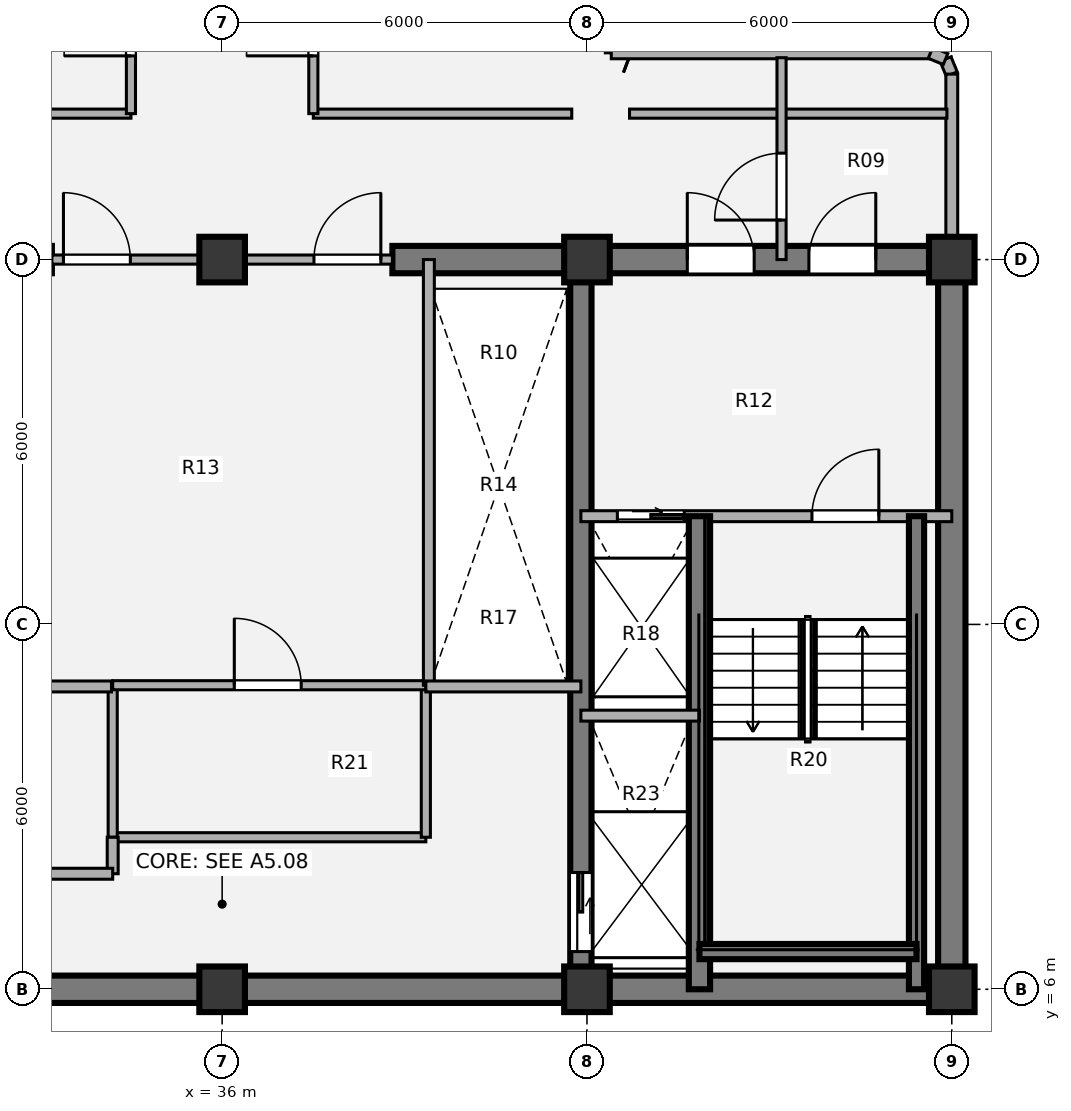
"""IFC4 building model, lengths in metres.
Left out: names, types, materials, properties, quantities, classifications, styles, units other than length and angle.
Written with IfcOpenShell. Run it as: python <this file> out.ifc"""

import sys

from ifc_helpers import new_model, si_unit, direction, frame, frame_2d, origin, origin_2d, place, context, subcontext, project, spatial, rectangle, extrude, source, transform, mapped, element, fill, save


model = new_model("IFC4")
c1 = context("Model", 3, precision=1e-05, world=origin(), true_north=direction((0.0, 1.0)))
c2 = subcontext(c1, "Body", "Model", "MODEL_VIEW")
j1 = project(units=[si_unit("LENGTHUNIT", "METRE"), si_unit("PLANEANGLEUNIT", "RADIAN")], contexts=[c1])
p1 = place(None, origin())
s1 = spatial("IfcSite", under=j1, at=p1, CompositionType="ELEMENT")
p2 = place(p1, origin())
s2 = spatial("IfcBuilding", under=s1, at=p2, CompositionType="ELEMENT")
p3 = place(p2, frame((0.0, 0.0, 213.12)))
s3 = spatial("IfcBuildingStorey", under=s2, at=p3, CompositionType="ELEMENT", Elevation=213.12)
m1 = source(origin(), c2, "Body", "SweptSolid", [
    extrude(rectangle(XDim=0.75, YDim=0.75, at=origin_2d()), origin(), (0.0, 0.0, 1.0), 5.4),
])
for number, where, z_axis, x_axis in (
    (1, (36.0, 6.0, 0.0), (0.0, 0.0, 1.0), (1.0, 0.0, 0.0)),
    (2, (42.0, 6.0, 0.0), (0.0, 0.0, 1.0), (1.0, 0.0, 0.0)),
    (3, (48.0, 6.0, 0.0), (0.0, 0.0, 1.0), (1.0, 0.0, 0.0)),
    (4, (36.0, 18.0, 0.0), (0.0, 0.0, 1.0), (1.0, 0.0, 0.0)),
    (5, (42.0, 18.0, 0.0), (0.0, 0.0, 1.0), (1.0, 0.0, 0.0)),
    (6, (48.0, 18.0, 0.0), (0.0, 0.0, 1.0), (1.0, 0.0, 0.0)),
):
    element("IfcColumn", number, at=place(p3, frame(where, z_axis=z_axis, x_axis=x_axis)), inside=s3, PredefinedType="COLUMN", context=c2, shape_type="MappedRepresentation", body=[
        mapped(m1, transform((0.0, 0.0, 0.0), x_axis=(1.0, 0.0, 0.0), y_axis=(0.0, 1.0, 0.0), z_axis=(0.0, 0.0, 1.0), scale=1.0)),
    ])
p4 = place(p3, frame((48.225, 6.0, 0.0), z_axis=(0.0, 0.0, 1.0), x_axis=(-1.0, 0.0, 0.0)))
e7 = element("IfcWall", 7, at=p4, inside=s3, PredefinedType="SHEAR", context=c2, shape_type="SweptSolid", body=[
    extrude(rectangle(XDim=24.45, YDim=0.45, at=frame_2d((12.225, 0.0))), origin(), (0.0, 0.0, 1.0), 5.4),
])
p5 = place(p3, frame((48.0, 18.0, 0.0), z_axis=(0.0, 0.0, 1.0), x_axis=(0.0, -1.0, 0.0)))
e8 = element("IfcWall", 8, at=p5, inside=s3, PredefinedType="SHEAR", context=c2, shape_type="SweptSolid", body=[
    extrude(rectangle(XDim=12.0, YDim=0.45, at=frame_2d((6.0, 0.0))), origin(), (0.0, 0.0, 1.0), 5.4),
])
p6 = place(p3, frame((38.8, 18.0, 0.0), z_axis=(0.0, 0.0, 1.0), x_axis=(1.0, 0.0, 0.0)))
e9 = element("IfcWall", 9, at=p6, inside=s3, PredefinedType="SHEAR", context=c2, shape_type="SweptSolid", body=[
    extrude(rectangle(XDim=9.425, YDim=0.45, at=frame_2d((4.712, 0.0))), origin(), (0.0, 0.0, 1.0), 5.4),
])
p7 = place(p6, frame((4.85, 0.0, 0.0)))
e10 = element("IfcOpeningElement", 10, at=p7, cuts=e9, PredefinedType="OPENING", context=c2, shape_type="SweptSolid", body=[
    extrude(rectangle(XDim=1.1, YDim=2.1, at=origin_2d()), frame((0.55, 0.235, 1.05), z_axis=(0.0, -1.0, 0.0), x_axis=(1.0, 0.0, 0.0)), (0.0, 0.0, 1.0), 0.47),
])
p8 = place(p6, frame((6.85, 0.0, 0.0)))
e11 = element("IfcOpeningElement", 11, at=p8, cuts=e9, PredefinedType="OPENING", context=c2, shape_type="SweptSolid", body=[
    extrude(rectangle(XDim=1.1, YDim=2.1, at=origin_2d()), frame((0.55, 0.235, 1.05), z_axis=(0.0, -1.0, 0.0), x_axis=(1.0, 0.0, 0.0)), (0.0, 0.0, 1.0), 0.47),
])
p9 = place(p3, frame((41.9, 18.0, 0.0), z_axis=(0.0, 0.0, 1.0), x_axis=(0.0, -1.0, 0.0)))
e12 = element("IfcWall", 12, at=p9, inside=s3, PredefinedType="SHEAR", context=c2, shape_type="SweptSolid", body=[
    extrude(rectangle(XDim=12.0, YDim=0.35, at=frame_2d((6.0, 0.0))), origin(), (0.0, 0.0, 1.0), 5.4),
])
p10 = place(p9, frame((10.08, 0.0, 0.0)))
e13 = element("IfcOpeningElement", 13, at=p10, cuts=e12, PredefinedType="OPENING", context=c2, shape_type="SweptSolid", body=[
    extrude(rectangle(XDim=1.3, YDim=2.1, at=origin_2d()), frame((0.65, 0.185, 1.05), z_axis=(0.0, -1.0, 0.0), x_axis=(1.0, 0.0, 0.0)), (0.0, 0.0, 1.0), 0.37),
])
p11 = place(p3, frame((47.897, 21.298, 0.0), z_axis=(0.0, 0.0, 1.0), x_axis=(0.382673670509, -0.923883575944, 0.0)))
e14 = element("IfcWall", 14, at=p11, inside=s3, PredefinedType="SOLIDWALL", context=c2, shape_type="SweptSolid", body=[
    extrude(rectangle(XDim=0.268, YDim=0.195, at=frame_2d((0.134, 0.0))), origin(), (0.0, 0.0, 1.0), 5.08),
])
p12 = place(p3, frame((48.0, 21.05, 0.0), z_axis=(0.0, 0.0, 1.0), x_axis=(0.0, -1.0, 0.0)))
e15 = element("IfcWall", 15, at=p12, inside=s3, PredefinedType="SOLIDWALL", context=c2, shape_type="SweptSolid", body=[
    extrude(rectangle(XDim=2.695, YDim=0.195, at=frame_2d((1.348, 0.0))), origin(), (0.0, 0.0, 1.0), 3.268),
])
p13 = place(p3, frame((42.4, 21.4, 0.0), z_axis=(0.0, 0.0, 1.0), x_axis=(1.0, 0.0, 0.0)))
e16 = element("IfcWall", 16, at=p13, inside=s3, PredefinedType="SOLIDWALL", context=c2, shape_type="SweptSolid", body=[
    extrude(rectangle(XDim=5.25, YDim=0.195, at=frame_2d((2.625, 0.0))), origin(), (0.0, 0.0, 1.0), 5.08),
])
p14 = place(p3, frame((47.65, 21.4, 0.0), z_axis=(0.0, 0.0, 1.0), x_axis=(0.924205486139, -0.381895560841, 0.0)))
e17 = element("IfcWall", 17, at=p14, inside=s3, PredefinedType="SOLIDWALL", context=c2, shape_type="SweptSolid", body=[
    extrude(rectangle(XDim=0.268, YDim=0.195, at=frame_2d((0.134, 0.0))), origin(), (0.0, 0.0, 1.0), 5.08),
])
p15 = place(p3, frame((34.2, 8.5, 0.0), z_axis=(0.0, 0.0, 1.0), x_axis=(1.0, 0.0, 0.0)))
e18 = element("IfcWall", 18, at=p15, inside=s3, PredefinedType="PARTITIONING", context=c2, shape_type="SweptSolid", body=[
    extrude(rectangle(XDim=5.15, YDim=0.15, at=frame_2d((2.575, 0.0))), origin(), (0.0, 0.0, 1.0), 5.05),
])
for number, where, z_axis, x_axis in (
    (19, (34.2, 8.5, 0.0), (0.0, 0.0, 1.0), (0.0, 1.0, 0.0)),
    (20, (39.35, 8.5, 0.0), (0.0, 0.0, 1.0), (0.0, 1.0, 0.0)),
):
    element("IfcWall", number, at=place(p3, frame(where, z_axis=z_axis, x_axis=x_axis)), inside=s3, PredefinedType="PARTITIONING", context=c2, shape_type="SweptSolid", body=[
        extrude(rectangle(XDim=2.5, YDim=0.15, at=frame_2d((1.25, 0.0))), origin(), (0.0, 0.0, 1.0), 5.05),
    ])
p16 = place(p3, frame((34.2, 11.0, 0.0), z_axis=(0.0, 0.0, 1.0), x_axis=(1.0, 0.0, 0.0)))
e21 = element("IfcWall", 21, at=p16, inside=s3, PredefinedType="PARTITIONING", context=c2, shape_type="SweptSolid", body=[
    extrude(rectangle(XDim=5.15, YDim=0.15, at=frame_2d((2.575, 0.0))), origin(), (0.0, 0.0, 1.0), 5.05),
])
p17 = place(p16, frame((2.0, 0.0, 0.0)))
e22 = element("IfcOpeningElement", 22, at=p17, cuts=e21, PredefinedType="OPENING", context=c2, shape_type="SweptSolid", body=[
    extrude(rectangle(XDim=1.1, YDim=2.1, at=origin_2d()), frame((0.55, 0.085, 1.05), z_axis=(0.0, -1.0, 0.0), x_axis=(1.0, 0.0, 0.0)), (0.0, 0.0, 1.0), 0.17),
])
p18 = place(p3, frame((39.4, 11.0, 0.0), z_axis=(0.0, 0.0, 1.0), x_axis=(0.0, 1.0, 0.0)))
e23 = element("IfcWall", 23, at=p18, inside=s3, PredefinedType="PARTITIONING", context=c2, shape_type="SweptSolid", body=[
    extrude(rectangle(XDim=7.0, YDim=0.18, at=frame_2d((3.5, 0.0))), origin(), (0.0, 0.0, 1.0), 5.05),
])
p19 = place(p3, frame((30.1, 10.98, 0.0), z_axis=(0.0, 0.0, 1.0), x_axis=(1.0, 0.0, 0.0)))
e24 = element("IfcWall", 24, at=p19, inside=s3, PredefinedType="PARTITIONING", context=c2, shape_type="SweptSolid", body=[
    extrude(rectangle(XDim=4.08, YDim=0.18, at=frame_2d((2.04, 0.0))), origin(), (0.0, 0.0, 1.0), 5.05),
])
p20 = place(p3, frame((34.2, 7.9, 0.0), z_axis=(0.0, 0.0, 1.0), x_axis=(0.0, 1.0, 0.0)))
e25 = element("IfcWall", 25, at=p20, inside=s3, PredefinedType="PARTITIONING", context=c2, shape_type="SweptSolid", body=[
    extrude(rectangle(XDim=0.6, YDim=0.18, at=frame_2d((0.3, 0.0))), origin(), (0.0, 0.0, 1.0), 5.05),
])
p21 = place(p3, frame((32.6, 7.9, 0.0), z_axis=(0.0, 0.0, 1.0), x_axis=(1.0, 0.0, 0.0)))
e26 = element("IfcWall", 26, at=p21, inside=s3, PredefinedType="PARTITIONING", context=c2, shape_type="SweptSolid", body=[
    extrude(rectangle(XDim=1.6, YDim=0.18, at=frame_2d((0.8, 0.0))), origin(), (0.0, 0.0, 1.0), 5.05),
])
p22 = place(p3, frame((39.35, 10.98, 0.0), z_axis=(0.0, 0.0, 1.0), x_axis=(1.0, 0.0, 0.0)))
e27 = element("IfcWall", 27, at=p22, inside=s3, PredefinedType="PARTITIONING", context=c2, shape_type="SweptSolid", body=[
    extrude(rectangle(XDim=2.55, YDim=0.18, at=frame_2d((1.275, 0.0))), origin(), (0.0, 0.0, 1.0), 5.05),
])
p23 = place(p3, frame((33.2, 18.0, 0.0), z_axis=(0.0, 0.0, 1.0), x_axis=(1.0, 0.0, 0.0)))
e28 = element("IfcWall", 28, at=p23, inside=s3, PredefinedType="PARTITIONING", context=c2, shape_type="SweptSolid", body=[
    extrude(rectangle(XDim=5.6, YDim=0.15, at=frame_2d((2.8, 0.0))), origin(), (0.0, 0.0, 1.0), 4.065),
])
p24 = place(p23, frame((0.19, 0.0, 0.0)))
e29 = element("IfcOpeningElement", 29, at=p24, cuts=e28, PredefinedType="OPENING", context=c2, shape_type="SweptSolid", body=[
    extrude(rectangle(XDim=1.1, YDim=2.1, at=origin_2d()), frame((0.55, 0.085, 1.05), z_axis=(0.0, -1.0, 0.0), x_axis=(1.0, 0.0, 0.0)), (0.0, 0.0, 1.0), 0.17),
])
p25 = place(p23, frame((4.31, 0.0, 0.0)))
e30 = element("IfcOpeningElement", 30, at=p25, cuts=e28, PredefinedType="OPENING", context=c2, shape_type="SweptSolid", body=[
    extrude(rectangle(XDim=1.1, YDim=2.1, at=origin_2d()), frame((0.55, 0.085, 1.05), z_axis=(0.0, -1.0, 0.0), x_axis=(1.0, 0.0, 0.0)), (0.0, 0.0, 1.0), 0.17),
])
p26 = place(p3, frame((41.9, 13.78, 0.0), z_axis=(0.0, 0.0, 1.0), x_axis=(1.0, 0.0, 0.0)))
e31 = element("IfcWall", 31, at=p26, inside=s3, PredefinedType="PARTITIONING", context=c2, shape_type="SweptSolid", body=[
    extrude(rectangle(XDim=6.1, YDim=0.18, at=frame_2d((3.05, 0.0))), origin(), (0.0, 0.0, 1.0), 2.229),
])
p27 = place(p26, frame((0.6, 0.0, 0.0)))
e32 = element("IfcOpeningElement", 32, at=p27, cuts=e31, PredefinedType="OPENING", context=c2, shape_type="SweptSolid", body=[
    extrude(rectangle(XDim=1.1, YDim=2.1, at=origin_2d()), frame((0.55, 0.1, 1.05), z_axis=(0.0, -1.0, 0.0), x_axis=(1.0, 0.0, 0.0)), (0.0, 0.0, 1.0), 0.2),
])
p28 = place(p26, frame((3.8, 0.0, 0.0)))
e33 = element("IfcOpeningElement", 33, at=p28, cuts=e31, PredefinedType="OPENING", context=c2, shape_type="SweptSolid", body=[
    extrude(rectangle(XDim=1.1, YDim=2.1, at=origin_2d()), frame((0.55, 0.1, 1.05), z_axis=(0.0, -1.0, 0.0), x_axis=(1.0, 0.0, 0.0)), (0.0, 0.0, 1.0), 0.2),
])
p29 = place(p3, frame((43.85, 6.0, 0.0), z_axis=(0.0, 0.0, 1.0), x_axis=(0.0, 1.0, 0.0)))
e34 = element("IfcWall", 34, at=p29, inside=s3, PredefinedType="SHEAR", context=c2, shape_type="SweptSolid", body=[
    extrude(rectangle(XDim=7.78, YDim=0.35, at=frame_2d((3.89, 0.0))), origin(), (0.0, 0.0, 1.0), 5.4),
])
p30 = place(p3, frame((47.42, 6.0, 0.0), z_axis=(0.0, 0.0, 1.0), x_axis=(0.0, 1.0, 0.0)))
e35 = element("IfcWall", 35, at=p30, inside=s3, PredefinedType="SHEAR", context=c2, shape_type="SweptSolid", body=[
    extrude(rectangle(XDim=7.78, YDim=0.25, at=frame_2d((3.89, 0.0))), origin(), (0.0, 0.0, 1.0), 5.4),
])
p31 = place(p3, frame((43.85, 6.62, 0.0), z_axis=(0.0, 0.0, 1.0), x_axis=(1.0, 0.0, 0.0)))
e36 = element("IfcWall", 36, at=p31, inside=s3, PredefinedType="SHEAR", context=c2, shape_type="SweptSolid", body=[
    extrude(rectangle(XDim=3.57, YDim=0.25, at=frame_2d((1.785, 0.0))), origin(), (0.0, 0.0, 1.0), 5.4),
])
p32 = place(p3, frame((41.9, 10.5, 0.0), z_axis=(0.0, 0.0, 1.0), x_axis=(1.0, 0.0, 0.0)))
e37 = element("IfcWall", 37, at=p32, inside=s3, PredefinedType="PARTITIONING", context=c2, shape_type="SweptSolid", body=[
    extrude(rectangle(XDim=1.95, YDim=0.18, at=frame_2d((0.975, 0.0))), origin(), (0.0, 0.0, 1.0), 5.05),
])
for number, where, z_axis, x_axis in (
    (38, (30.25, 20.4, 0.0), (0.0, 0.0, 1.0), (1.0, 0.0, 0.0)),
    (39, (37.5, 20.4, 0.0), (0.0, 0.0, 1.0), (1.0, 0.0, 0.0)),
):
    element("IfcWall", number, at=place(p3, frame(where, z_axis=z_axis, x_axis=x_axis)), inside=s3, PredefinedType="PARTITIONING", context=c2, shape_type="SweptSolid", body=[
        extrude(rectangle(XDim=4.25, YDim=0.15, at=frame_2d((2.125, 0.0))), origin(), (0.0, 0.0, 1.0), 5.05),
    ])
p33 = place(p3, frame((42.7, 20.4, 0.0), z_axis=(0.0, 0.0, 1.0), x_axis=(1.0, 0.0, 0.0)))
e40 = element("IfcWall", 40, at=p33, inside=s3, PredefinedType="PARTITIONING", context=c2, shape_type="SweptSolid", body=[
    extrude(rectangle(XDim=5.22, YDim=0.15, at=frame_2d((2.61, 0.0))), origin(), (0.0, 0.0, 1.0), 5.05),
])
p34 = place(p3, frame((34.5, 20.4, 0.0), z_axis=(0.0, 0.0, 1.0), x_axis=(0.0, 1.0, 0.0)))
e41 = element("IfcWall", 41, at=p34, inside=s3, PredefinedType="PARTITIONING", context=c2, shape_type="SweptSolid", body=[
    extrude(rectangle(XDim=11.8, YDim=0.15, at=frame_2d((5.9, 0.0))), origin(), (0.0, 0.0, 1.0), 5.05),
])
p35 = place(p34, frame((0.95, 0.0, 0.0)))
e42 = element("IfcOpeningElement", 42, at=p35, cuts=e41, PredefinedType="OPENING", context=c2, shape_type="SweptSolid", body=[
    extrude(rectangle(XDim=1.1, YDim=2.1, at=origin_2d()), frame((0.55, 0.085, 1.05), z_axis=(0.0, -1.0, 0.0), x_axis=(1.0, 0.0, 0.0)), (0.0, 0.0, 1.0), 0.17),
])
p36 = place(p3, frame((37.5, 20.4, 0.0), z_axis=(0.0, 0.0, 1.0), x_axis=(0.0, 1.0, 0.0)))
e43 = element("IfcWall", 43, at=p36, inside=s3, PredefinedType="PARTITIONING", context=c2, shape_type="SweptSolid", body=[
    extrude(rectangle(XDim=11.8, YDim=0.15, at=frame_2d((5.9, 0.0))), origin(), (0.0, 0.0, 1.0), 5.05),
])
p37 = place(p36, frame((0.95, 0.0, 0.0)))
e44 = element("IfcOpeningElement", 44, at=p37, cuts=e43, PredefinedType="OPENING", context=c2, shape_type="SweptSolid", body=[
    extrude(rectangle(XDim=1.1, YDim=2.1, at=origin_2d()), frame((0.55, 0.085, 1.05), z_axis=(0.0, -1.0, 0.0), x_axis=(1.0, 0.0, 0.0)), (0.0, 0.0, 1.0), 0.17),
])
p38 = place(p3, frame((45.2, 18.0, 0.0), z_axis=(0.0, 0.0, 1.0), x_axis=(0.0, 1.0, 0.0)))
e45 = element("IfcWall", 45, at=p38, inside=s3, PredefinedType="PARTITIONING", context=c2, shape_type="SweptSolid", body=[
    extrude(rectangle(XDim=3.32, YDim=0.15, at=frame_2d((1.66, 0.0))), origin(), (0.0, 0.0, 1.0), 5.05),
])
p39 = place(p38, frame((0.65, 0.0, 0.0)))
e46 = element("IfcOpeningElement", 46, at=p39, cuts=e45, PredefinedType="OPENING", context=c2, shape_type="SweptSolid", body=[
    extrude(rectangle(XDim=1.1, YDim=2.1, at=origin_2d()), frame((0.55, 0.085, 1.05), z_axis=(0.0, -1.0, 0.0), x_axis=(1.0, 0.0, 0.0)), (0.0, 0.0, 1.0), 0.17),
])
m2 = source(origin(), c2, "Body", "SweptSolid", [
    extrude(rectangle(XDim=1.1, YDim=2.1, at=origin_2d()), frame((0.55, 0.025, 1.05), z_axis=(0.0, -1.0, 0.0), x_axis=(1.0, 0.0, 0.0)), (0.0, 0.0, 1.0), 0.05),
])
p40 = place(p17, origin())
e47 = element("IfcDoor", 47, at=p40, inside=s3, OperationType="SINGLE_SWING_LEFT", PredefinedType="DOOR", context=c2, shape_type="MappedRepresentation", body=[
    mapped(m2, transform((0.0, 0.0, 0.0), x_axis=(1.0, 0.0, 0.0), y_axis=(0.0, 1.0, 0.0), z_axis=(0.0, 0.0, 1.0), scale=1.0)),
])
fill(e22, e47)
m3 = source(origin(), c2, "Body", "SweptSolid", [
    extrude(rectangle(XDim=1.1, YDim=2.1, at=origin_2d()), frame((0.55, 0.025, 1.05), z_axis=(0.0, -1.0, 0.0), x_axis=(1.0, 0.0, 0.0)), (0.0, 0.0, 1.0), 0.05),
])
p41 = place(p24, origin())
e48 = element("IfcDoor", 48, at=p41, inside=s3, OperationType="SINGLE_SWING_LEFT", PredefinedType="DOOR", context=c2, shape_type="MappedRepresentation", body=[
    mapped(m3, transform((0.0, 0.0, 0.0), x_axis=(1.0, 0.0, 0.0), y_axis=(0.0, 1.0, 0.0), z_axis=(0.0, 0.0, 1.0), scale=1.0)),
])
fill(e29, e48)
p42 = place(p25, origin())
e49 = element("IfcDoor", 49, at=p42, inside=s3, OperationType="SINGLE_SWING_RIGHT", PredefinedType="DOOR", context=c2, shape_type="MappedRepresentation", body=[
    mapped(m3, transform((0.0, 0.0, 0.0), x_axis=(1.0, 0.0, 0.0), y_axis=(0.0, 1.0, 0.0), z_axis=(0.0, 0.0, 1.0), scale=1.0)),
])
fill(e30, e49)
m4 = source(origin(), c2, "Body", "SweptSolid", [
    extrude(rectangle(XDim=1.1, YDim=2.1, at=origin_2d()), frame((0.55, 0.025, 1.05), z_axis=(0.0, -1.0, 0.0), x_axis=(1.0, 0.0, 0.0)), (0.0, 0.0, 1.0), 0.05),
])
p43 = place(p27, origin())
e50 = element("IfcDoor", 50, at=p43, inside=s3, OperationType="SLIDING_TO_RIGHT", PredefinedType="DOOR", context=c2, shape_type="MappedRepresentation", body=[
    mapped(m4, transform((0.0, 0.0, 0.0), x_axis=(1.0, 0.0, 0.0), y_axis=(0.0, 1.0, 0.0), z_axis=(0.0, 0.0, 1.0), scale=1.0)),
])
fill(e32, e50)
m5 = source(origin(), c2, "Body", "SweptSolid", [
    extrude(rectangle(XDim=1.1, YDim=2.1, at=origin_2d()), frame((0.55, 0.025, 1.05), z_axis=(0.0, -1.0, 0.0), x_axis=(1.0, 0.0, 0.0)), (0.0, 0.0, 1.0), 0.05),
])
p44 = place(p28, origin())
e51 = element("IfcDoor", 51, at=p44, inside=s3, OperationType="SINGLE_SWING_RIGHT", PredefinedType="DOOR", context=c2, shape_type="MappedRepresentation", body=[
    mapped(m5, transform((0.0, 0.0, 0.0), x_axis=(1.0, 0.0, 0.0), y_axis=(0.0, 1.0, 0.0), z_axis=(0.0, 0.0, 1.0), scale=1.0)),
])
fill(e33, e51)
m6 = source(origin(), c2, "Body", "SweptSolid", [
    extrude(rectangle(XDim=1.3, YDim=2.1, at=origin_2d()), frame((0.65, 0.025, 1.05), z_axis=(0.0, -1.0, 0.0), x_axis=(1.0, 0.0, 0.0)), (0.0, 0.0, 1.0), 0.05),
])
p45 = place(p10, origin())
e52 = element("IfcDoor", 52, at=p45, inside=s3, OperationType="SLIDING_TO_LEFT", PredefinedType="DOOR", context=c2, shape_type="MappedRepresentation", body=[
    mapped(m6, transform((0.0, 0.0, 0.0), x_axis=(1.0, 0.0, 0.0), y_axis=(0.0, 1.0, 0.0), z_axis=(0.0, 0.0, 1.0), scale=1.0)),
])
fill(e13, e52)
p46 = place(p7, origin())
e53 = element("IfcDoor", 53, at=p46, inside=s3, OperationType="SINGLE_SWING_LEFT", PredefinedType="DOOR", context=c2, shape_type="MappedRepresentation", body=[
    mapped(m3, transform((0.0, 0.0, 0.0), x_axis=(1.0, 0.0, 0.0), y_axis=(0.0, 1.0, 0.0), z_axis=(0.0, 0.0, 1.0), scale=1.0)),
])
fill(e10, e53)
p47 = place(p8, origin())
e54 = element("IfcDoor", 54, at=p47, inside=s3, OperationType="SINGLE_SWING_RIGHT", PredefinedType="DOOR", context=c2, shape_type="MappedRepresentation", body=[
    mapped(m3, transform((0.0, 0.0, 0.0), x_axis=(1.0, 0.0, 0.0), y_axis=(0.0, 1.0, 0.0), z_axis=(0.0, 0.0, 1.0), scale=1.0)),
])
fill(e11, e54)
p48 = place(p35, origin())
e55 = element("IfcDoor", 55, at=p48, inside=s3, OperationType="SINGLE_SWING_LEFT", PredefinedType="DOOR", context=c2, shape_type="MappedRepresentation", body=[
    mapped(m2, transform((0.0, 0.0, 0.0), x_axis=(1.0, 0.0, 0.0), y_axis=(0.0, 1.0, 0.0), z_axis=(0.0, 0.0, 1.0), scale=1.0)),
])
fill(e42, e55)
p49 = place(p37, origin())
e56 = element("IfcDoor", 56, at=p49, inside=s3, OperationType="SINGLE_SWING_LEFT", PredefinedType="DOOR", context=c2, shape_type="MappedRepresentation", body=[
    mapped(m2, transform((0.0, 0.0, 0.0), x_axis=(1.0, 0.0, 0.0), y_axis=(0.0, 1.0, 0.0), z_axis=(0.0, 0.0, 1.0), scale=1.0)),
])
fill(e44, e56)
p50 = place(p39, origin())
e57 = element("IfcDoor", 57, at=p50, inside=s3, OperationType="SINGLE_SWING_LEFT", PredefinedType="DOOR", context=c2, shape_type="MappedRepresentation", body=[
    mapped(m2, transform((0.0, 0.0, 0.0), x_axis=(1.0, 0.0, 0.0), y_axis=(0.0, 1.0, 0.0), z_axis=(0.0, 0.0, 1.0), scale=1.0)),
])
fill(e46, e57)
save(model, sys.argv[1])
